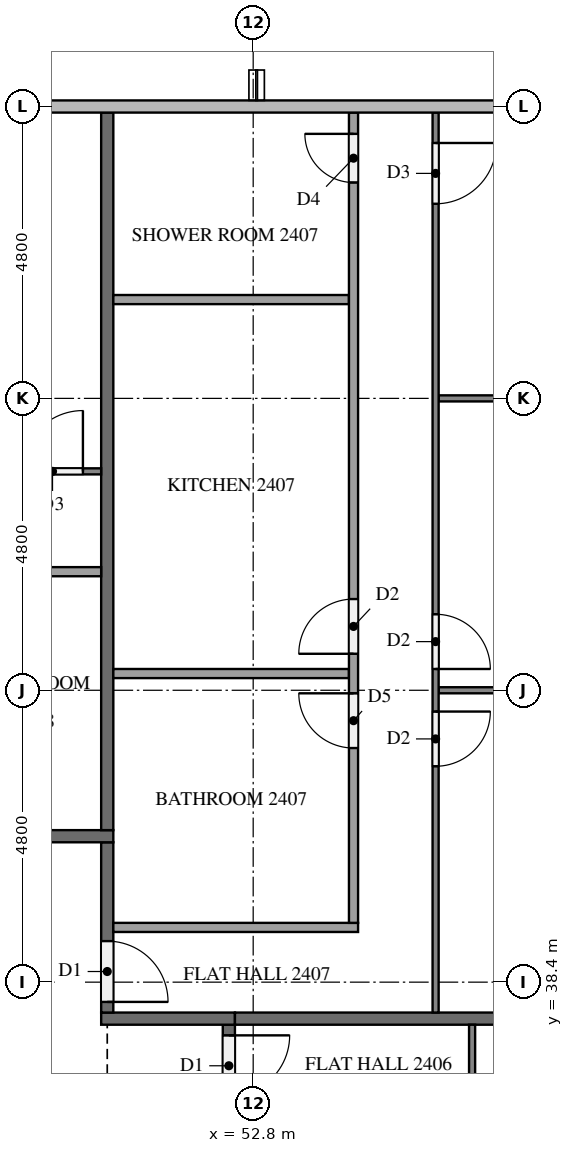
"""IFC4 building model, lengths in metres.
Left out: names, types, materials, properties, quantities, classifications, styles, units other than length and angle.
Written with IfcOpenShell. Run it as: python <this file> out.ifc"""

import sys

from ifc_helpers import new_model, si_unit, direction, frame, frame_2d, origin, place, context, subcontext, project, spatial, rectangle, extrude, element, fill, save


model = new_model("IFC4")
c1 = context("Model", 3, precision=1e-05, world=origin(), true_north=direction((0.0, 1.0)))
c2 = subcontext(c1, "Body", "Model", "MODEL_VIEW")
j1 = project(units=[si_unit("LENGTHUNIT", "METRE"), si_unit("PLANEANGLEUNIT", "RADIAN")], contexts=[c1])
p1 = place(None, origin())
s1 = spatial("IfcSite", under=j1, at=p1, CompositionType="ELEMENT")
p2 = place(p1, origin())
s2 = spatial("IfcBuilding", under=s1, at=p2, CompositionType="ELEMENT")
p3 = place(p2, frame((0.0, 0.0, 96.2)))
s3 = spatial("IfcBuildingStorey", under=s2, at=p3, CompositionType="ELEMENT", Elevation=96.2)
p4 = place(p3, frame((52.4, 37.7, 0.0), z_axis=(0.0, 0.0, 1.0), x_axis=(0.0, -1.0, 0.0)))
e1 = element("IfcWall", 1, at=p4, inside=s3, PredefinedType="PARTITIONING", context=c2, shape_type="SweptSolid", body=[
    extrude(rectangle(XDim=22.6, YDim=0.2, at=frame_2d((11.3, 0.0))), origin(), (0.0, 0.0, 1.0), 3.2),
])
p5 = place(p4, frame((21.425, 0.0, 0.0)))
e2 = element("IfcOpeningElement", 2, at=p5, cuts=e1, PredefinedType="OPENING", context=c2, shape_type="SweptSolid", body=[
    extrude(rectangle(XDim=1.0, YDim=2.1, at=frame_2d((0.5, 1.05))), frame((0.0, 0.11, 0.0), z_axis=(0.0, -1.0, 0.0), x_axis=(1.0, 0.0, 0.0)), (0.0, 0.0, 1.0), 0.22),
])
p6 = place(p4, frame((0.175, 0.0, 0.0)))
e3 = element("IfcOpeningElement", 3, at=p6, cuts=e1, PredefinedType="OPENING", context=c2, shape_type="SweptSolid", body=[
    extrude(rectangle(XDim=1.0, YDim=2.1, at=frame_2d((0.5, 1.05))), frame((0.0, 0.11, 0.0), z_axis=(0.0, -1.0, 0.0), x_axis=(1.0, 0.0, 0.0)), (0.0, 0.0, 1.0), 0.22),
])
p7 = place(p3, frame((52.5, 37.8, 0.0), z_axis=(0.0, 0.0, 1.0), x_axis=(-1.0, 0.0, 0.0)))
e4 = element("IfcWall", 4, at=p7, inside=s3, PredefinedType="PARTITIONING", context=c2, shape_type="SweptSolid", body=[
    extrude(rectangle(XDim=2.2, YDim=0.2, at=frame_2d((1.1, 0.0))), origin(), (0.0, 0.0, 1.0), 3.2),
])
p8 = place(p3, frame((50.4, 40.7, 0.0), z_axis=(0.0, 0.0, 1.0), x_axis=(0.0, -1.0, 0.0)))
e5 = element("IfcWall", 5, at=p8, inside=s3, PredefinedType="PARTITIONING", context=c2, shape_type="SweptSolid", body=[
    extrude(rectangle(XDim=2.8, YDim=0.2, at=frame_2d((1.4, 0.0))), origin(), (0.0, 0.0, 1.0), 3.2),
])
p9 = place(p8, frame((1.625, 0.0, 0.0)))
e6 = element("IfcOpeningElement", 6, at=p9, cuts=e5, PredefinedType="OPENING", context=c2, shape_type="SweptSolid", body=[
    extrude(rectangle(XDim=1.0, YDim=2.1, at=frame_2d((0.5, 1.05))), frame((0.0, 0.11, 0.0), z_axis=(0.0, -1.0, 0.0), x_axis=(1.0, 0.0, 0.0)), (0.0, 0.0, 1.0), 0.22),
])
p10 = place(p3, frame((11.9, 40.8, 0.0), z_axis=(0.0, 0.0, 1.0), x_axis=(1.0, 0.0, 0.0)))
e7 = element("IfcWall", 7, at=p10, inside=s3, PredefinedType="PARTITIONING", context=c2, shape_type="SweptSolid", body=[
    extrude(rectangle(XDim=38.6, YDim=0.2, at=frame_2d((19.3, 0.0))), origin(), (0.0, 0.0, 1.0), 3.2),
])
p11 = place(p10, frame((31.575, 0.0, 0.0)))
e8 = element("IfcOpeningElement", 8, at=p11, cuts=e7, PredefinedType="OPENING", context=c2, shape_type="SweptSolid", body=[
    extrude(rectangle(XDim=1.0, YDim=2.1, at=frame_2d((0.5, 1.05))), frame((0.0, 0.11, 0.0), z_axis=(0.0, -1.0, 0.0), x_axis=(1.0, 0.0, 0.0)), (0.0, 0.0, 1.0), 0.22),
])
p12 = place(p10, frame((14.775, 0.0, 0.0)))
e9 = element("IfcOpeningElement", 9, at=p12, cuts=e7, PredefinedType="OPENING", context=c2, shape_type="SweptSolid", body=[
    extrude(rectangle(XDim=1.0, YDim=2.1, at=frame_2d((0.5, 1.05))), frame((0.0, 0.11, 0.0), z_axis=(0.0, -1.0, 0.0), x_axis=(1.0, 0.0, 0.0)), (0.0, 0.0, 1.0), 0.22),
])
p13 = place(p10, frame((0.375, 0.0, 0.0)))
e10 = element("IfcOpeningElement", 10, at=p13, cuts=e7, PredefinedType="OPENING", context=c2, shape_type="SweptSolid", body=[
    extrude(rectangle(XDim=1.0, YDim=2.1, at=frame_2d((0.5, 1.05))), frame((0.0, 0.11, 0.0), z_axis=(0.0, -1.0, 0.0), x_axis=(1.0, 0.0, 0.0)), (0.0, 0.0, 1.0), 0.22),
])
p14 = place(p3, frame((52.5, 37.8, 0.0), z_axis=(0.0, 0.0, 1.0), x_axis=(1.0, 0.0, 0.0)))
e11 = element("IfcWall", 11, at=p14, inside=s3, PredefinedType="PARTITIONING", context=c2, shape_type="SweptSolid", body=[
    extrude(rectangle(XDim=9.475, YDim=0.2, at=frame_2d((4.738, 0.0))), origin(), (0.0, 0.0, 1.0), 3.2),
])
p15 = place(p3, frame((50.4, 40.9, 0.0), z_axis=(0.0, 0.0, 1.0), x_axis=(0.0, 1.0, 0.0)))
e12 = element("IfcWall", 12, at=p15, inside=s3, PredefinedType="PARTITIONING", context=c2, shape_type="SweptSolid", body=[
    extrude(rectangle(XDim=11.8, YDim=0.2, at=frame_2d((5.9, 0.0))), origin(), (0.0, 0.0, 1.0), 3.2),
])
p16 = place(p3, frame((56.4, 37.7, 0.0), z_axis=(0.0, 0.0, 1.0), x_axis=(0.0, -1.0, 0.0)))
e13 = element("IfcWall", 13, at=p16, inside=s3, PredefinedType="PARTITIONING", context=c2, shape_type="SweptSolid", body=[
    extrude(rectangle(XDim=8.8, YDim=0.1, at=frame_2d((4.4, 0.0))), origin(), (0.0, 0.0, 1.0), 3.2),
])
p17 = place(p16, frame((2.75, 0.0, 0.0)))
e14 = element("IfcOpeningElement", 14, at=p17, cuts=e13, PredefinedType="OPENING", context=c2, shape_type="SweptSolid", body=[
    extrude(rectangle(XDim=1.0, YDim=2.1, at=frame_2d((0.5, 1.05))), frame((0.0, 0.06, 0.0), z_axis=(0.0, -1.0, 0.0), x_axis=(1.0, 0.0, 0.0)), (0.0, 0.0, 1.0), 0.12),
])
p18 = place(p16, frame((4.45, 0.0, 0.0)))
e15 = element("IfcOpeningElement", 15, at=p18, cuts=e13, PredefinedType="OPENING", context=c2, shape_type="SweptSolid", body=[
    extrude(rectangle(XDim=0.9, YDim=2.1, at=frame_2d((0.45, 1.05))), frame((0.0, 0.06, 0.0), z_axis=(0.0, -1.0, 0.0), x_axis=(1.0, 0.0, 0.0)), (0.0, 0.0, 1.0), 0.12),
])
p19 = place(p3, frame((55.85, 43.2, 0.0), z_axis=(0.0, 0.0, 1.0), x_axis=(1.0, 0.0, 0.0)))
e16 = element("IfcWall", 16, at=p19, inside=s3, PredefinedType="PARTITIONING", context=c2, shape_type="SweptSolid", body=[
    extrude(rectangle(XDim=6.45, YDim=0.1, at=frame_2d((3.225, 0.0))), origin(), (0.0, 0.0, 1.0), 3.2),
])
p20 = place(p3, frame((55.85, 48.0, 0.0), z_axis=(0.0, 0.0, 1.0), x_axis=(1.0, 0.0, 0.0)))
e17 = element("IfcWall", 17, at=p20, inside=s3, PredefinedType="PARTITIONING", context=c2, shape_type="SweptSolid", body=[
    extrude(rectangle(XDim=5.975, YDim=0.1, at=frame_2d((2.987, 0.0))), origin(), (0.0, 0.0, 1.0), 3.2),
])
p21 = place(p3, frame((55.8, 52.7, 0.0), z_axis=(0.0, 0.0, 1.0), x_axis=(0.0, -1.0, 0.0)))
e18 = element("IfcWall", 18, at=p21, inside=s3, PredefinedType="PARTITIONING", context=c2, shape_type="SweptSolid", body=[
    extrude(rectangle(XDim=14.8, YDim=0.1, at=frame_2d((7.4, 0.0))), origin(), (0.0, 0.0, 1.0), 3.2),
])
p22 = place(p21, frame((9.85, 0.0, 0.0)))
e19 = element("IfcOpeningElement", 19, at=p22, cuts=e18, PredefinedType="OPENING", context=c2, shape_type="SweptSolid", body=[
    extrude(rectangle(XDim=0.9, YDim=2.1, at=frame_2d((0.45, 1.05))), frame((0.0, 0.06, 0.0), z_axis=(0.0, -1.0, 0.0), x_axis=(1.0, 0.0, 0.0)), (0.0, 0.0, 1.0), 0.12),
])
p23 = place(p21, frame((8.25, 0.0, 0.0)))
e20 = element("IfcOpeningElement", 20, at=p23, cuts=e18, PredefinedType="OPENING", context=c2, shape_type="SweptSolid", body=[
    extrude(rectangle(XDim=0.9, YDim=2.1, at=frame_2d((0.45, 1.05))), frame((0.0, 0.06, 0.0), z_axis=(0.0, -1.0, 0.0), x_axis=(1.0, 0.0, 0.0)), (0.0, 0.0, 1.0), 0.12),
])
p24 = place(p21, frame((0.5, 0.0, 0.0)))
e21 = element("IfcOpeningElement", 21, at=p24, cuts=e18, PredefinedType="OPENING", context=c2, shape_type="SweptSolid", body=[
    extrude(rectangle(XDim=1.0, YDim=2.1, at=frame_2d((0.5, 1.05))), frame((0.0, 0.06, 0.0), z_axis=(0.0, -1.0, 0.0), x_axis=(1.0, 0.0, 0.0)), (0.0, 0.0, 1.0), 0.12),
])
for number, where, z_axis, x_axis in (
    (22, (50.5, 43.475, 0.0), (0.0, 0.0, 1.0), (1.0, 0.0, 0.0)),
    (23, (50.5, 49.625, 0.0), (0.0, 0.0, 1.0), (1.0, 0.0, 0.0)),
):
    element("IfcWall", number, at=place(p3, frame(where, z_axis=z_axis, x_axis=x_axis)), inside=s3, PredefinedType="PARTITIONING", context=c2, shape_type="SweptSolid", body=[
        extrude(rectangle(XDim=3.875, YDim=0.15, at=frame_2d((1.938, 0.0))), origin(), (0.0, 0.0, 1.0), 3.2),
    ])
p25 = place(p3, frame((50.5, 39.3, 0.0), z_axis=(0.0, 0.0, 1.0), x_axis=(1.0, 0.0, 0.0)))
e24 = element("IfcWall", 24, at=p25, inside=s3, PredefinedType="PARTITIONING", context=c2, shape_type="SweptSolid", body=[
    extrude(rectangle(XDim=4.025, YDim=0.15, at=frame_2d((2.012, 0.0))), origin(), (0.0, 0.0, 1.0), 3.2),
])
p26 = place(p3, frame((54.45, 39.375, 0.0), z_axis=(0.0, 0.0, 1.0), x_axis=(0.0, 1.0, 0.0)))
e25 = element("IfcWall", 25, at=p26, inside=s3, PredefinedType="PARTITIONING", context=c2, shape_type="SweptSolid", body=[
    extrude(rectangle(XDim=13.325, YDim=0.15, at=frame_2d((6.663, 0.0))), origin(), (0.0, 0.0, 1.0), 3.2),
])
p27 = place(p26, frame((2.875, 0.0, 0.0)))
e26 = element("IfcOpeningElement", 26, at=p27, cuts=e25, PredefinedType="OPENING", context=c2, shape_type="SweptSolid", body=[
    extrude(rectangle(XDim=0.9, YDim=2.1, at=frame_2d((0.45, 1.05))), frame((0.0, 0.085, 0.0), z_axis=(0.0, -1.0, 0.0), x_axis=(1.0, 0.0, 0.0)), (0.0, 0.0, 1.0), 0.17),
])
p28 = place(p26, frame((4.425, 0.0, 0.0)))
e27 = element("IfcOpeningElement", 27, at=p28, cuts=e25, PredefinedType="OPENING", context=c2, shape_type="SweptSolid", body=[
    extrude(rectangle(XDim=0.9, YDim=2.1, at=frame_2d((0.45, 1.05))), frame((0.0, 0.085, 0.0), z_axis=(0.0, -1.0, 0.0), x_axis=(1.0, 0.0, 0.0)), (0.0, 0.0, 1.0), 0.17),
])
p29 = place(p26, frame((12.175, 0.0, 0.0)))
e28 = element("IfcOpeningElement", 28, at=p29, cuts=e25, PredefinedType="OPENING", context=c2, shape_type="SweptSolid", body=[
    extrude(rectangle(XDim=0.8, YDim=2.1, at=frame_2d((0.4, 1.05))), frame((0.0, 0.085, 0.0), z_axis=(0.0, -1.0, 0.0), x_axis=(1.0, 0.0, 0.0)), (0.0, 0.0, 1.0), 0.17),
])
p30 = place(p3, frame((43.3, 46.8, 0.0), z_axis=(0.0, 0.0, 1.0), x_axis=(1.0, 0.0, 0.0)))
e29 = element("IfcWall", 29, at=p30, inside=s3, PredefinedType="PARTITIONING", context=c2, shape_type="SweptSolid", body=[
    extrude(rectangle(XDim=7.0, YDim=0.1, at=frame_2d((3.5, 0.0))), origin(), (0.0, 0.0, 1.0), 3.2),
])
p31 = place(p30, frame((5.7, 0.0, 0.0)))
e30 = element("IfcOpeningElement", 30, at=p31, cuts=e29, PredefinedType="OPENING", context=c2, shape_type="SweptSolid", body=[
    extrude(rectangle(XDim=1.0, YDim=2.1, at=frame_2d((0.5, 1.05))), frame((0.0, 0.06, 0.0), z_axis=(0.0, -1.0, 0.0), x_axis=(1.0, 0.0, 0.0)), (0.0, 0.0, 1.0), 0.12),
])
p32 = place(p3, frame((50.3, 45.15, 0.0), z_axis=(0.0, 0.0, 1.0), x_axis=(-1.0, 0.0, 0.0)))
e31 = element("IfcWall", 31, at=p32, inside=s3, PredefinedType="PARTITIONING", context=c2, shape_type="SweptSolid", body=[
    extrude(rectangle(XDim=5.525, YDim=0.15, at=frame_2d((2.763, 0.0))), origin(), (0.0, 0.0, 1.0), 3.2),
])
p33 = place(p32, frame((2.535, 0.0, 0.0)))
e32 = element("IfcOpeningElement", 32, at=p33, cuts=e31, PredefinedType="OPENING", context=c2, shape_type="SweptSolid", body=[
    extrude(rectangle(XDim=0.9, YDim=2.1, at=frame_2d((0.45, 1.05))), frame((0.0, 0.085, 0.0), z_axis=(0.0, -1.0, 0.0), x_axis=(1.0, 0.0, 0.0)), (0.0, 0.0, 1.0), 0.17),
])
p34 = place(p32, frame((1.085, 0.0, 0.0)))
e33 = element("IfcOpeningElement", 33, at=p34, cuts=e31, PredefinedType="OPENING", context=c2, shape_type="SweptSolid", body=[
    extrude(rectangle(XDim=0.8, YDim=2.1, at=frame_2d((0.4, 1.05))), frame((0.0, 0.085, 0.0), z_axis=(0.0, -1.0, 0.0), x_axis=(1.0, 0.0, 0.0)), (0.0, 0.0, 1.0), 0.17),
])
p35 = place(p6, origin())
e34 = element("IfcDoor", 34, at=p35, inside=s3, OperationType="SINGLE_SWING_LEFT", PredefinedType="DOOR", context=c2, shape_type="SweptSolid", body=[
    extrude(rectangle(XDim=1.0, YDim=2.1, at=frame_2d((0.5, 1.05))), frame((0.0, 0.025, 0.0), z_axis=(0.0, -1.0, 0.0), x_axis=(1.0, 0.0, 0.0)), (0.0, 0.0, 1.0), 0.05),
])
fill(e3, e34)
p36 = place(p9, origin())
e35 = element("IfcDoor", 35, at=p36, inside=s3, OperationType="SINGLE_SWING_RIGHT", PredefinedType="DOOR", context=c2, shape_type="SweptSolid", body=[
    extrude(rectangle(XDim=1.0, YDim=2.1, at=frame_2d((0.5, 1.05))), frame((0.0, 0.025, 0.0), z_axis=(0.0, -1.0, 0.0), x_axis=(1.0, 0.0, 0.0)), (0.0, 0.0, 1.0), 0.05),
])
fill(e6, e35)
p37 = place(p22, origin())
e36 = element("IfcDoor", 36, at=p37, inside=s3, OperationType="SINGLE_SWING_LEFT", PredefinedType="DOOR", context=c2, shape_type="SweptSolid", body=[
    extrude(rectangle(XDim=0.9, YDim=2.1, at=frame_2d((0.45, 1.05))), frame((0.0, 0.025, 0.0), z_axis=(0.0, -1.0, 0.0), x_axis=(1.0, 0.0, 0.0)), (0.0, 0.0, 1.0), 0.05),
])
fill(e19, e36)
p38 = place(p23, origin())
e37 = element("IfcDoor", 37, at=p38, inside=s3, OperationType="SINGLE_SWING_RIGHT", PredefinedType="DOOR", context=c2, shape_type="SweptSolid", body=[
    extrude(rectangle(XDim=0.9, YDim=2.1, at=frame_2d((0.45, 1.05))), frame((0.0, 0.025, 0.0), z_axis=(0.0, -1.0, 0.0), x_axis=(1.0, 0.0, 0.0)), (0.0, 0.0, 1.0), 0.05),
])
fill(e20, e37)
p39 = place(p24, origin())
e38 = element("IfcDoor", 38, at=p39, inside=s3, OperationType="SINGLE_SWING_LEFT", PredefinedType="DOOR", context=c2, shape_type="SweptSolid", body=[
    extrude(rectangle(XDim=1.0, YDim=2.1, at=frame_2d((0.5, 1.05))), frame((0.0, 0.025, 0.0), z_axis=(0.0, -1.0, 0.0), x_axis=(1.0, 0.0, 0.0)), (0.0, 0.0, 1.0), 0.05),
])
fill(e21, e38)
p40 = place(p27, origin())
e39 = element("IfcDoor", 39, at=p40, inside=s3, OperationType="SINGLE_SWING_RIGHT", PredefinedType="DOOR", context=c2, shape_type="SweptSolid", body=[
    extrude(rectangle(XDim=0.9, YDim=2.1, at=frame_2d((0.45, 1.05))), frame((0.0, 0.025, 0.0), z_axis=(0.0, -1.0, 0.0), x_axis=(1.0, 0.0, 0.0)), (0.0, 0.0, 1.0), 0.05),
])
fill(e26, e39)
p41 = place(p28, origin())
e40 = element("IfcDoor", 40, at=p41, inside=s3, OperationType="SINGLE_SWING_LEFT", PredefinedType="DOOR", context=c2, shape_type="SweptSolid", body=[
    extrude(rectangle(XDim=0.9, YDim=2.1, at=frame_2d((0.45, 1.05))), frame((0.0, 0.025, 0.0), z_axis=(0.0, -1.0, 0.0), x_axis=(1.0, 0.0, 0.0)), (0.0, 0.0, 1.0), 0.05),
])
fill(e27, e40)
p42 = place(p29, origin())
e41 = element("IfcDoor", 41, at=p42, inside=s3, OperationType="SINGLE_SWING_RIGHT", PredefinedType="DOOR", context=c2, shape_type="SweptSolid", body=[
    extrude(rectangle(XDim=0.8, YDim=2.1, at=frame_2d((0.4, 1.05))), frame((0.0, 0.025, 0.0), z_axis=(0.0, -1.0, 0.0), x_axis=(1.0, 0.0, 0.0)), (0.0, 0.0, 1.0), 0.05),
])
fill(e28, e41)
p43 = place(p31, origin())
e42 = element("IfcDoor", 42, at=p43, inside=s3, OperationType="SINGLE_SWING_RIGHT", PredefinedType="DOOR", context=c2, shape_type="SweptSolid", body=[
    extrude(rectangle(XDim=1.0, YDim=2.1, at=frame_2d((0.5, 1.05))), frame((0.0, 0.025, 0.0), z_axis=(0.0, -1.0, 0.0), x_axis=(1.0, 0.0, 0.0)), (0.0, 0.0, 1.0), 0.05),
])
fill(e30, e42)
save(model, sys.argv[1])
